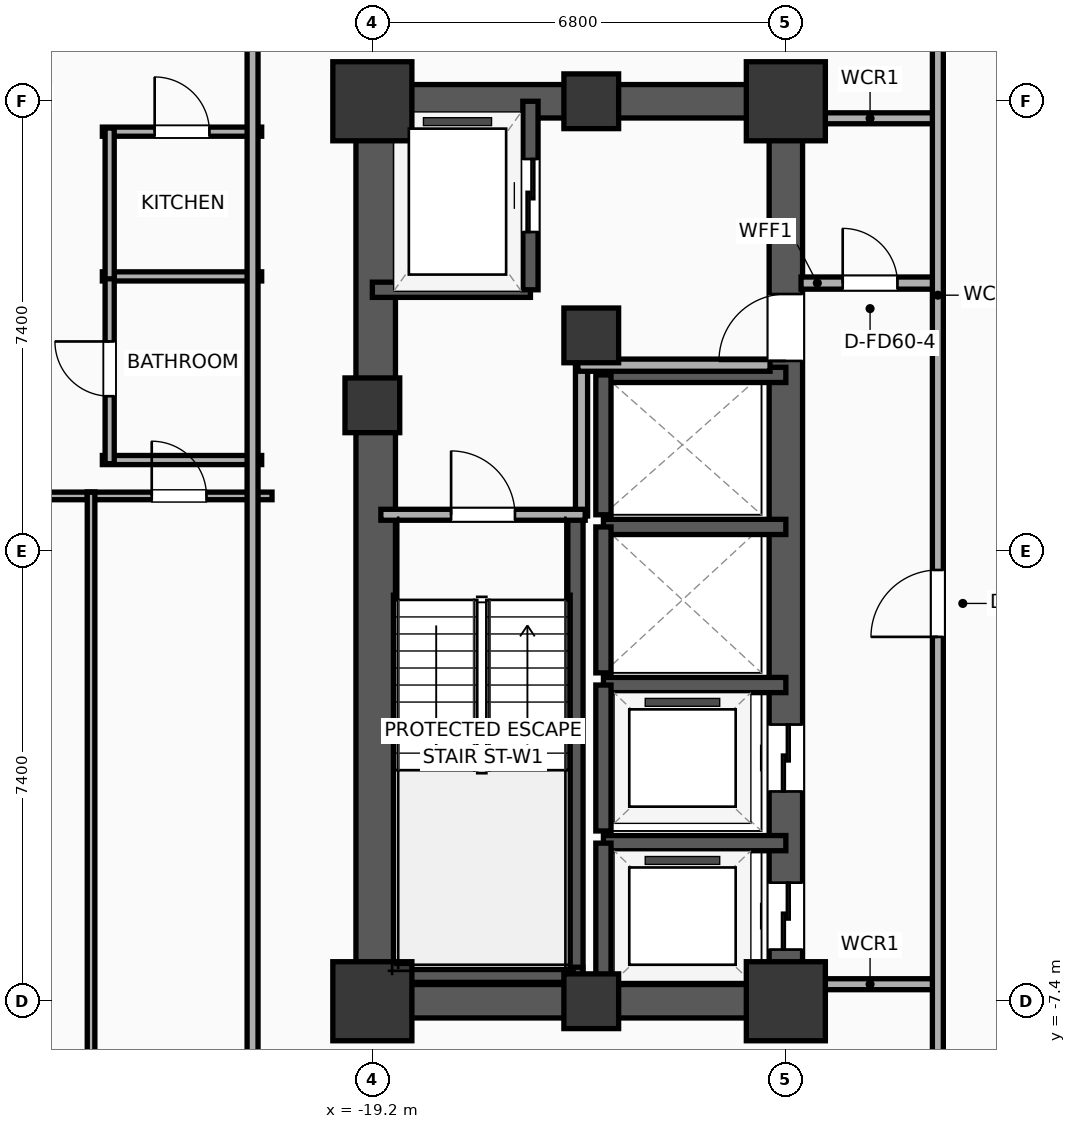
"""IFC4 building model, lengths in metres.
Left out: names, types, materials, properties, quantities, classifications, styles, units other than length and angle.
Written with IfcOpenShell. Run it as: python <this file> out.ifc"""

import sys

from ifc_helpers import new_model, si_unit, direction, frame, frame_2d, origin, origin_2d, place, context, subcontext, project, spatial, rectangle, extrude, element, fill, save


model = new_model("IFC4")
c1 = context("Model", 3, precision=1e-05, world=origin(), true_north=direction((0.0, 1.0)))
c2 = subcontext(c1, "Body", "Model", "MODEL_VIEW")
j1 = project(units=[si_unit("LENGTHUNIT", "METRE"), si_unit("PLANEANGLEUNIT", "RADIAN")], contexts=[c1])
p1 = place(None, origin())
s1 = spatial("IfcSite", under=j1, at=p1, CompositionType="ELEMENT")
p2 = place(p1, origin())
s2 = spatial("IfcBuilding", under=s1, at=p2, CompositionType="ELEMENT")
p3 = place(p2, frame((0.0, 0.0, 124.8)))
s3 = spatial("IfcBuildingStorey", under=s2, at=p3, CompositionType="ELEMENT", Elevation=124.8)
p4 = place(p3, frame((-19.2, -7.4, 0.0), z_axis=(0.0, 0.0, 1.0), x_axis=(1.0, 0.0, 0.0)))
e1 = element("IfcColumn", 1, at=p4, inside=s3, PredefinedType="COLUMN", context=c2, shape_type="SweptSolid", body=[
    extrude(rectangle(XDim=1.3, YDim=1.3, at=origin_2d()), origin(), (0.0, 0.0, 1.0), 3.9),
])
p5 = place(p3, frame((-19.2, 2.4, 0.0), z_axis=(0.0, 0.0, 1.0), x_axis=(1.0, 0.0, 0.0)))
e2 = element("IfcColumn", 2, at=p5, inside=s3, PredefinedType="COLUMN", context=c2, shape_type="SweptSolid", body=[
    extrude(rectangle(XDim=0.9, YDim=0.9, at=origin_2d()), origin(), (0.0, 0.0, 1.0), 3.9),
])
p6 = place(p3, frame((-19.2, 7.4, 0.0), z_axis=(0.0, 0.0, 1.0), x_axis=(1.0, 0.0, 0.0)))
e3 = element("IfcColumn", 3, at=p6, inside=s3, PredefinedType="COLUMN", context=c2, shape_type="SweptSolid", body=[
    extrude(rectangle(XDim=1.3, YDim=1.3, at=origin_2d()), origin(), (0.0, 0.0, 1.0), 3.9),
])
for number, where, z_axis, x_axis in (
    (4, (-15.6, -7.4, 0.0), (0.0, 0.0, 1.0), (1.0, 0.0, 0.0)),
    (5, (-15.6, 7.4, 0.0), (0.0, 0.0, 1.0), (1.0, 0.0, 0.0)),
):
    element("IfcColumn", number, at=place(p3, frame(where, z_axis=z_axis, x_axis=x_axis)), inside=s3, PredefinedType="COLUMN", context=c2, shape_type="SweptSolid", body=[
        extrude(rectangle(XDim=0.9, YDim=0.9, at=origin_2d()), origin(), (0.0, 0.0, 1.0), 3.9),
    ])
p7 = place(p3, frame((-12.4, -7.4, 0.0), z_axis=(0.0, 0.0, 1.0), x_axis=(1.0, 0.0, 0.0)))
e6 = element("IfcColumn", 6, at=p7, inside=s3, PredefinedType="COLUMN", context=c2, shape_type="SweptSolid", body=[
    extrude(rectangle(XDim=1.3, YDim=1.3, at=origin_2d()), origin(), (0.0, 0.0, 1.0), 3.9),
])
p8 = place(p3, frame((-15.6, 3.55, 0.0), z_axis=(0.0, 0.0, 1.0), x_axis=(1.0, 0.0, 0.0)))
e7 = element("IfcColumn", 7, at=p8, inside=s3, PredefinedType="COLUMN", context=c2, shape_type="SweptSolid", body=[
    extrude(rectangle(XDim=0.9, YDim=0.9, at=origin_2d()), origin(), (0.0, 0.0, 1.0), 3.9),
])
p9 = place(p3, frame((-12.4, 7.4, 0.0), z_axis=(0.0, 0.0, 1.0), x_axis=(1.0, 0.0, 0.0)))
e8 = element("IfcColumn", 8, at=p9, inside=s3, PredefinedType="COLUMN", context=c2, shape_type="SweptSolid", body=[
    extrude(rectangle(XDim=1.3, YDim=1.3, at=origin_2d()), origin(), (0.0, 0.0, 1.0), 3.9),
])
for number, where, z_axis, x_axis in (
    (9, (-19.475, -7.4, 0.0), (0.0, 0.0, 1.0), (1.0, 0.0, 0.0)),
    (10, (-19.475, 7.4, 0.0), (0.0, 0.0, 1.0), (1.0, 0.0, 0.0)),
):
    element("IfcWall", number, at=place(p3, frame(where, z_axis=z_axis, x_axis=x_axis)), inside=s3, PredefinedType="SHEAR", context=c2, shape_type="SweptSolid", body=[
        extrude(rectangle(XDim=7.35, YDim=0.55, at=frame_2d((3.675, 0.0))), origin(), (0.0, 0.0, 1.0), 3.65),
    ])
p10 = place(p3, frame((-19.145, -7.4, 0.0), z_axis=(0.0, 0.0, 1.0), x_axis=(0.0, 1.0, 0.0)))
e11 = element("IfcWall", 11, at=p10, inside=s3, PredefinedType="SHEAR", context=c2, shape_type="SweptSolid", body=[
    extrude(rectangle(XDim=14.8, YDim=0.65, at=frame_2d((7.4, 0.0))), origin(), (0.0, 0.0, 1.0), 3.65),
])
p11 = place(p3, frame((-12.4, -7.4, 0.0), z_axis=(0.0, 0.0, 1.0), x_axis=(0.0, 1.0, 0.0)))
e12 = element("IfcWall", 12, at=p11, inside=s3, PredefinedType="SHEAR", context=c2, shape_type="SweptSolid", body=[
    extrude(rectangle(XDim=14.8, YDim=0.55, at=frame_2d((7.4, 0.0))), origin(), (0.0, 0.0, 1.0), 3.65),
])
p12 = place(p11, frame((0.85, 0.0, 0.0)))
e13 = element("IfcOpeningElement", 13, at=p12, cuts=e12, PredefinedType="OPENING", context=c2, shape_type="SweptSolid", body=[
    extrude(rectangle(XDim=1.1, YDim=2.05, at=frame_2d((0.55, 1.025))), frame((0.0, 0.285, 0.0), z_axis=(0.0, -1.0, 0.0), x_axis=(1.0, 0.0, 0.0)), (0.0, 0.0, 1.0), 0.57),
])
p13 = place(p11, frame((3.45, 0.0, 0.0)))
e14 = element("IfcOpeningElement", 14, at=p13, cuts=e12, PredefinedType="OPENING", context=c2, shape_type="SweptSolid", body=[
    extrude(rectangle(XDim=1.1, YDim=2.05, at=frame_2d((0.55, 1.025))), frame((0.0, 0.285, 0.0), z_axis=(0.0, -1.0, 0.0), x_axis=(1.0, 0.0, 0.0)), (0.0, 0.0, 1.0), 0.57),
])
p14 = place(p11, frame((10.53, 0.0, 0.0)))
e15 = element("IfcOpeningElement", 15, at=p14, cuts=e12, PredefinedType="OPENING", context=c2, shape_type="SweptSolid", body=[
    extrude(rectangle(XDim=1.1, YDim=2.05, at=frame_2d((0.55, 1.025))), frame((0.0, 0.285, 0.0), z_axis=(0.0, -1.0, 0.0), x_axis=(1.0, 0.0, 0.0)), (0.0, 0.0, 1.0), 0.57),
])
p15 = place(p3, frame((-15.86, -7.085, 0.0), z_axis=(0.0, 0.0, 1.0), x_axis=(0.0, 1.0, 0.0)))
e16 = element("IfcWall", 16, at=p15, inside=s3, PredefinedType="SOLIDWALL", context=c2, shape_type="SweptSolid", body=[
    extrude(rectangle(XDim=7.685, YDim=0.25, at=frame_2d((3.843, 0.0))), origin(), (0.0, 0.0, 1.0), 3.65),
])
p16 = place(p3, frame((-19.2, -6.965, 0.0), z_axis=(0.0, 0.0, 1.0), x_axis=(1.0, 0.0, 0.0)))
e17 = element("IfcWall", 17, at=p16, inside=s3, PredefinedType="SOLIDWALL", context=c2, shape_type="SweptSolid", body=[
    extrude(rectangle(XDim=3.46, YDim=0.25, at=frame_2d((1.73, 0.0))), origin(), (0.0, 0.0, 1.0), 3.65),
])
p17 = place(p3, frame((-19.2, 4.3, 0.0), z_axis=(0.0, 0.0, 1.0), x_axis=(1.0, 0.0, 0.0)))
e18 = element("IfcWall", 18, at=p17, inside=s3, PredefinedType="SOLIDWALL", context=c2, shape_type="SweptSolid", body=[
    extrude(rectangle(XDim=2.6, YDim=0.25, at=frame_2d((1.3, 0.0))), origin(), (0.0, 0.0, 1.0), 3.65),
])
p18 = place(p3, frame((-16.6, 4.3, 0.0), z_axis=(0.0, 0.0, 1.0), x_axis=(0.0, 1.0, 0.0)))
e19 = element("IfcWall", 19, at=p18, inside=s3, PredefinedType="SOLIDWALL", context=c2, shape_type="SweptSolid", body=[
    extrude(rectangle(XDim=3.1, YDim=0.25, at=frame_2d((1.55, 0.0))), origin(), (0.0, 0.0, 1.0), 3.65),
])
p19 = place(p18, frame((0.95, 0.0, 0.0)))
e20 = element("IfcOpeningElement", 20, at=p19, cuts=e19, PredefinedType="OPENING", context=c2, shape_type="SweptSolid", body=[
    extrude(rectangle(XDim=1.2, YDim=2.05, at=frame_2d((0.6, 1.025))), frame((0.0, 0.135, 0.0), z_axis=(0.0, -1.0, 0.0), x_axis=(1.0, 0.0, 0.0)), (0.0, 0.0, 1.0), 0.27),
])
p20 = place(p3, frame((-12.4, -4.8, 0.0), z_axis=(0.0, 0.0, 1.0), x_axis=(-1.0, 0.0, 0.0)))
e21 = element("IfcWall", 21, at=p20, inside=s3, PredefinedType="SOLIDWALL", context=c2, shape_type="SweptSolid", body=[
    extrude(rectangle(XDim=3.0, YDim=0.25, at=frame_2d((1.5, 0.0))), origin(), (0.0, 0.0, 1.0), 3.65),
])
p21 = place(p3, frame((-15.4, -4.8, 0.0), z_axis=(0.0, 0.0, 1.0), x_axis=(0.0, -1.0, 0.0)))
e22 = element("IfcWall", 22, at=p21, inside=s3, PredefinedType="SOLIDWALL", context=c2, shape_type="SweptSolid", body=[
    extrude(rectangle(XDim=2.6, YDim=0.25, at=frame_2d((1.3, 0.0))), origin(), (0.0, 0.0, 1.0), 3.65),
])
p22 = place(p3, frame((-12.4, -2.2, 0.0), z_axis=(0.0, 0.0, 1.0), x_axis=(-1.0, 0.0, 0.0)))
e23 = element("IfcWall", 23, at=p22, inside=s3, PredefinedType="SOLIDWALL", context=c2, shape_type="SweptSolid", body=[
    extrude(rectangle(XDim=3.0, YDim=0.25, at=frame_2d((1.5, 0.0))), origin(), (0.0, 0.0, 1.0), 3.65),
])
p23 = place(p3, frame((-15.4, -2.2, 0.0), z_axis=(0.0, 0.0, 1.0), x_axis=(0.0, -1.0, 0.0)))
e24 = element("IfcWall", 24, at=p23, inside=s3, PredefinedType="SOLIDWALL", context=c2, shape_type="SweptSolid", body=[
    extrude(rectangle(XDim=2.4, YDim=0.25, at=frame_2d((1.2, 0.0))), origin(), (0.0, 0.0, 1.0), 3.65),
])
p24 = place(p3, frame((-12.4, 0.4, 0.0), z_axis=(0.0, 0.0, 1.0), x_axis=(-1.0, 0.0, 0.0)))
e25 = element("IfcWall", 25, at=p24, inside=s3, PredefinedType="SOLIDWALL", context=c2, shape_type="SweptSolid", body=[
    extrude(rectangle(XDim=3.0, YDim=0.25, at=frame_2d((1.5, 0.0))), origin(), (0.0, 0.0, 1.0), 3.65),
])
p25 = place(p3, frame((-15.4, 0.4, 0.0), z_axis=(0.0, 0.0, 1.0), x_axis=(0.0, -1.0, 0.0)))
e26 = element("IfcWall", 26, at=p25, inside=s3, PredefinedType="SOLIDWALL", context=c2, shape_type="SweptSolid", body=[
    extrude(rectangle(XDim=2.4, YDim=0.25, at=frame_2d((1.2, 0.0))), origin(), (0.0, 0.0, 1.0), 3.65),
])
p26 = place(p3, frame((-12.4, 2.9, 0.0), z_axis=(0.0, 0.0, 1.0), x_axis=(-1.0, 0.0, 0.0)))
e27 = element("IfcWall", 27, at=p26, inside=s3, PredefinedType="SOLIDWALL", context=c2, shape_type="SweptSolid", body=[
    extrude(rectangle(XDim=3.0, YDim=0.25, at=frame_2d((1.5, 0.0))), origin(), (0.0, 0.0, 1.0), 3.65),
])
p27 = place(p3, frame((-15.4, 2.9, 0.0), z_axis=(0.0, 0.0, 1.0), x_axis=(0.0, -1.0, 0.0)))
e28 = element("IfcWall", 28, at=p27, inside=s3, PredefinedType="SOLIDWALL", context=c2, shape_type="SweptSolid", body=[
    extrude(rectangle(XDim=2.3, YDim=0.25, at=frame_2d((1.15, 0.0))), origin(), (0.0, 0.0, 1.0), 3.65),
])
p28 = place(p3, frame((-15.76, 0.58, 0.0), z_axis=(0.0, 0.0, 1.0), x_axis=(0.0, 1.0, 0.0)))
e29 = element("IfcWall", 29, at=p28, inside=s3, PredefinedType="PARTITIONING", context=c2, shape_type="SweptSolid", body=[
    extrude(rectangle(XDim=2.52, YDim=0.2, at=frame_2d((1.26, 0.0))), origin(), (0.0, 0.0, 1.0), 3.65),
])
p29 = place(p3, frame((-15.82, 3.06, 0.0), z_axis=(0.0, 0.0, 1.0), x_axis=(1.0, 0.0, 0.0)))
e30 = element("IfcWall", 30, at=p29, inside=s3, PredefinedType="PARTITIONING", context=c2, shape_type="SweptSolid", body=[
    extrude(rectangle(XDim=3.16, YDim=0.2, at=frame_2d((1.58, 0.0))), origin(), (0.0, 0.0, 1.0), 3.65),
])
p30 = place(p3, frame((-19.06, 0.6, 0.0), z_axis=(0.0, 0.0, 1.0), x_axis=(1.0, 0.0, 0.0)))
e31 = element("IfcWall", 31, at=p30, inside=s3, PredefinedType="PARTITIONING", context=c2, shape_type="SweptSolid", body=[
    extrude(rectangle(XDim=3.36, YDim=0.18, at=frame_2d((1.68, 0.0))), origin(), (0.0, 0.0, 1.0), 3.65),
])
p31 = place(p30, frame((1.155, 0.0, 0.0)))
e32 = element("IfcOpeningElement", 32, at=p31, cuts=e31, PredefinedType="OPENING", context=c2, shape_type="SweptSolid", body=[
    extrude(rectangle(XDim=1.05, YDim=2.05, at=frame_2d((0.525, 1.025))), frame((0.0, 0.1, 0.0), z_axis=(0.0, -1.0, 0.0), x_axis=(1.0, 0.0, 0.0)), (0.0, 0.0, 1.0), 0.2),
])
p32 = place(p3, frame((-12.15, 4.41, 0.0), z_axis=(0.0, 0.0, 1.0), x_axis=(1.0, 0.0, 0.0)))
e33 = element("IfcWall", 33, at=p32, inside=s3, PredefinedType="PARTITIONING", context=c2, shape_type="SweptSolid", body=[
    extrude(rectangle(XDim=2.27, YDim=0.2, at=frame_2d((1.135, 0.0))), origin(), (0.0, 0.0, 1.0), 3.65),
])
p33 = place(p32, frame((0.685, 0.0, 0.0)))
e34 = element("IfcOpeningElement", 34, at=p33, cuts=e33, PredefinedType="OPENING", context=c2, shape_type="SweptSolid", body=[
    extrude(rectangle(XDim=0.9, YDim=2.05, at=frame_2d((0.45, 1.025))), frame((0.0, 0.11, 0.0), z_axis=(0.0, -1.0, 0.0), x_axis=(1.0, 0.0, 0.0)), (0.0, 0.0, 1.0), 0.22),
])
for number, where, z_axis, x_axis in (
    (35, (-12.15, 7.12, 0.0), (0.0, 0.0, 1.0), (1.0, 0.0, 0.0)),
    (36, (-12.15, -7.12, 0.0), (0.0, 0.0, 1.0), (1.0, 0.0, 0.0)),
):
    element("IfcWall", number, at=place(p3, frame(where, z_axis=z_axis, x_axis=x_axis)), inside=s3, PredefinedType="PARTITIONING", context=c2, shape_type="SweptSolid", body=[
        extrude(rectangle(XDim=2.27, YDim=0.18, at=frame_2d((1.135, 0.0))), origin(), (0.0, 0.0, 1.0), 3.65),
    ])
p34 = place(p3, frame((-9.9, -8.58, 0.0), z_axis=(0.0, 0.0, 1.0), x_axis=(0.0, 1.0, 0.0)))
e37 = element("IfcWall", 37, at=p34, inside=s3, PredefinedType="PARTITIONING", context=c2, shape_type="SweptSolid", body=[
    extrude(rectangle(XDim=17.16, YDim=0.18, at=frame_2d((8.58, 0.0))), origin(), (0.0, 0.0, 1.0), 3.65),
])
p35 = place(p34, frame((7.172, 0.0, 0.0)))
e38 = element("IfcOpeningElement", 38, at=p35, cuts=e37, PredefinedType="OPENING", context=c2, shape_type="SweptSolid", body=[
    extrude(rectangle(XDim=1.1, YDim=2.05, at=frame_2d((0.55, 1.025))), frame((0.0, 0.1, 0.0), z_axis=(0.0, -1.0, 0.0), x_axis=(1.0, 0.0, 0.0)), (0.0, 0.0, 1.0), 0.2),
])
p36 = place(p3, frame((-23.64, 6.9, 0.0), z_axis=(0.0, 0.0, 1.0), x_axis=(1.0, 0.0, 0.0)))
e39 = element("IfcWall", 39, at=p36, inside=s3, PredefinedType="PLUMBINGWALL", context=c2, shape_type="SweptSolid", body=[
    extrude(rectangle(XDim=2.62, YDim=0.15, at=frame_2d((1.31, 0.0))), origin(), (0.0, 0.0, 1.0), 3.65),
])
p37 = place(p36, frame((0.86, 0.0, 0.0)))
e40 = element("IfcOpeningElement", 40, at=p37, cuts=e39, PredefinedType="OPENING", context=c2, shape_type="SweptSolid", body=[
    extrude(rectangle(XDim=0.9, YDim=2.05, at=frame_2d((0.45, 1.025))), frame((0.0, 0.085, 0.0), z_axis=(0.0, -1.0, 0.0), x_axis=(1.0, 0.0, 0.0)), (0.0, 0.0, 1.0), 0.17),
])
for number, where, z_axis, x_axis in (
    (41, (-23.64, 4.52, 0.0), (0.0, 0.0, 1.0), (1.0, 0.0, 0.0)),
    (42, (-23.64, 1.5, 0.0), (0.0, 0.0, 1.0), (1.0, 0.0, 0.0)),
):
    element("IfcWall", number, at=place(p3, frame(where, z_axis=z_axis, x_axis=x_axis)), inside=s3, PredefinedType="PLUMBINGWALL", context=c2, shape_type="SweptSolid", body=[
        extrude(rectangle(XDim=2.62, YDim=0.15, at=frame_2d((1.31, 0.0))), origin(), (0.0, 0.0, 1.0), 3.65),
    ])
p38 = place(p3, frame((-23.52, 1.44, 0.0), z_axis=(0.0, 0.0, 1.0), x_axis=(0.0, 1.0, 0.0)))
e43 = element("IfcWall", 43, at=p38, inside=s3, PredefinedType="PLUMBINGWALL", context=c2, shape_type="SweptSolid", body=[
    extrude(rectangle(XDim=3.12, YDim=0.15, at=frame_2d((1.56, 0.0))), origin(), (0.0, 0.0, 1.0), 3.65),
])
p39 = place(p38, frame((1.11, 0.0, 0.0)))
e44 = element("IfcOpeningElement", 44, at=p39, cuts=e43, PredefinedType="OPENING", context=c2, shape_type="SweptSolid", body=[
    extrude(rectangle(XDim=0.9, YDim=2.05, at=frame_2d((0.45, 1.025))), frame((0.0, 0.085, 0.0), z_axis=(0.0, -1.0, 0.0), x_axis=(1.0, 0.0, 0.0)), (0.0, 0.0, 1.0), 0.17),
])
p40 = place(p3, frame((-23.52, 4.48, 0.0), z_axis=(0.0, 0.0, 1.0), x_axis=(0.0, 1.0, 0.0)))
e45 = element("IfcWall", 45, at=p40, inside=s3, PredefinedType="PLUMBINGWALL", context=c2, shape_type="SweptSolid", body=[
    extrude(rectangle(XDim=2.48, YDim=0.15, at=frame_2d((1.24, 0.0))), origin(), (0.0, 0.0, 1.0), 3.65),
])
p41 = place(p3, frame((-26.543, 0.91, 0.0), z_axis=(0.0, 0.0, 1.0), x_axis=(1.0, 0.0, 0.0)))
e46 = element("IfcWall", 46, at=p41, inside=s3, PredefinedType="PARTITIONING", context=c2, shape_type="SweptSolid", body=[
    extrude(rectangle(XDim=2.78, YDim=0.125, at=frame_2d((1.39, 0.0))), origin(), (0.0, 0.0, 1.0), 3.65),
])
p42 = place(p41, frame((0.94, 0.0, 0.0)))
e47 = element("IfcOpeningElement", 47, at=p42, cuts=e46, PredefinedType="OPENING", context=c2, shape_type="SweptSolid", body=[
    extrude(rectangle(XDim=0.9, YDim=2.05, at=frame_2d((0.45, 1.025))), frame((0.0, 0.073, 0.0), z_axis=(0.0, -1.0, 0.0), x_axis=(1.0, 0.0, 0.0)), (0.0, 0.0, 1.0), 0.145),
])
p43 = place(p3, frame((-23.888, 0.91, 0.0), z_axis=(0.0, 0.0, 1.0), x_axis=(1.0, 0.0, 0.0)))
e48 = element("IfcWall", 48, at=p43, inside=s3, PredefinedType="PARTITIONING", context=c2, shape_type="SweptSolid", body=[
    extrude(rectangle(XDim=3.038, YDim=0.125, at=frame_2d((1.519, 0.0))), origin(), (0.0, 0.0, 1.0), 3.65),
])
p44 = place(p43, frame((1.061, 0.0, 0.0)))
e49 = element("IfcOpeningElement", 49, at=p44, cuts=e48, PredefinedType="OPENING", context=c2, shape_type="SweptSolid", body=[
    extrude(rectangle(XDim=0.9, YDim=2.05, at=frame_2d((0.45, 1.025))), frame((0.0, 0.073, 0.0), z_axis=(0.0, -1.0, 0.0), x_axis=(1.0, 0.0, 0.0)), (0.0, 0.0, 1.0), 0.145),
])
p45 = place(p3, frame((-23.826, -8.81, 0.0), z_axis=(0.0, 0.0, 1.0), x_axis=(0.0, 1.0, 0.0)))
e50 = element("IfcWall", 50, at=p45, inside=s3, PredefinedType="PARTITIONING", context=c2, shape_type="SweptSolid", body=[
    extrude(rectangle(XDim=9.78, YDim=0.125, at=frame_2d((4.89, 0.0))), origin(), (0.0, 0.0, 1.0), 3.65),
])
p46 = place(p3, frame((-21.17, -8.61, 0.0), z_axis=(0.0, 0.0, 1.0), x_axis=(0.0, 1.0, 0.0)))
e51 = element("IfcWall", 51, at=p46, inside=s3, PredefinedType="PARTITIONING", context=c2, shape_type="SweptSolid", body=[
    extrude(rectangle(XDim=17.22, YDim=0.18, at=frame_2d((8.61, 0.0))), origin(), (0.0, 0.0, 1.0), 3.65),
])
p47 = place(p19, origin())
e52 = element("IfcDoor", 52, at=p47, inside=s3, OperationType="SLIDING_TO_LEFT", PredefinedType="DOOR", context=c2, shape_type="SweptSolid", body=[
    extrude(rectangle(XDim=1.2, YDim=2.05, at=frame_2d((0.6, 1.025))), frame((0.0, 0.025, 0.0), z_axis=(0.0, -1.0, 0.0), x_axis=(1.0, 0.0, 0.0)), (0.0, 0.0, 1.0), 0.05),
])
fill(e20, e52)
p48 = place(p12, origin())
e53 = element("IfcDoor", 53, at=p48, inside=s3, OperationType="SLIDING_TO_LEFT", PredefinedType="DOOR", context=c2, shape_type="SweptSolid", body=[
    extrude(rectangle(XDim=1.1, YDim=2.05, at=frame_2d((0.55, 1.025))), frame((0.0, 0.025, 0.0), z_axis=(0.0, -1.0, 0.0), x_axis=(1.0, 0.0, 0.0)), (0.0, 0.0, 1.0), 0.05),
])
fill(e13, e53)
p49 = place(p13, origin())
e54 = element("IfcDoor", 54, at=p49, inside=s3, OperationType="SLIDING_TO_LEFT", PredefinedType="DOOR", context=c2, shape_type="SweptSolid", body=[
    extrude(rectangle(XDim=1.1, YDim=2.05, at=frame_2d((0.55, 1.025))), frame((0.0, 0.025, 0.0), z_axis=(0.0, -1.0, 0.0), x_axis=(1.0, 0.0, 0.0)), (0.0, 0.0, 1.0), 0.05),
])
fill(e14, e54)
p50 = place(p31, origin())
e55 = element("IfcDoor", 55, at=p50, inside=s3, OperationType="SINGLE_SWING_LEFT", PredefinedType="DOOR", context=c2, shape_type="SweptSolid", body=[
    extrude(rectangle(XDim=1.05, YDim=2.05, at=frame_2d((0.525, 1.025))), frame((0.0, 0.025, 0.0), z_axis=(0.0, -1.0, 0.0), x_axis=(1.0, 0.0, 0.0)), (0.0, 0.0, 1.0), 0.05),
])
fill(e32, e55)
p51 = place(p33, origin())
e56 = element("IfcDoor", 56, at=p51, inside=s3, OperationType="SINGLE_SWING_LEFT", PredefinedType="DOOR", context=c2, shape_type="SweptSolid", body=[
    extrude(rectangle(XDim=0.9, YDim=2.05, at=frame_2d((0.45, 1.025))), frame((0.0, 0.025, 0.0), z_axis=(0.0, -1.0, 0.0), x_axis=(1.0, 0.0, 0.0)), (0.0, 0.0, 1.0), 0.05),
])
fill(e34, e56)
p52 = place(p35, origin())
e57 = element("IfcDoor", 57, at=p52, inside=s3, OperationType="SINGLE_SWING_LEFT", PredefinedType="DOOR", context=c2, shape_type="SweptSolid", body=[
    extrude(rectangle(XDim=1.1, YDim=2.05, at=frame_2d((0.55, 1.025))), frame((0.0, 0.025, 0.0), z_axis=(0.0, -1.0, 0.0), x_axis=(1.0, 0.0, 0.0)), (0.0, 0.0, 1.0), 0.05),
])
fill(e38, e57)
p53 = place(p37, origin())
e58 = element("IfcDoor", 58, at=p53, inside=s3, OperationType="SINGLE_SWING_LEFT", PredefinedType="DOOR", context=c2, shape_type="SweptSolid", body=[
    extrude(rectangle(XDim=0.9, YDim=2.05, at=frame_2d((0.45, 1.025))), frame((0.0, 0.025, 0.0), z_axis=(0.0, -1.0, 0.0), x_axis=(1.0, 0.0, 0.0)), (0.0, 0.0, 1.0), 0.05),
])
fill(e40, e58)
p54 = place(p39, origin())
e59 = element("IfcDoor", 59, at=p54, inside=s3, OperationType="SINGLE_SWING_RIGHT", PredefinedType="DOOR", context=c2, shape_type="SweptSolid", body=[
    extrude(rectangle(XDim=0.9, YDim=2.05, at=frame_2d((0.45, 1.025))), frame((0.0, 0.025, 0.0), z_axis=(0.0, -1.0, 0.0), x_axis=(1.0, 0.0, 0.0)), (0.0, 0.0, 1.0), 0.05),
])
fill(e44, e59)
p55 = place(p44, origin())
e60 = element("IfcDoor", 60, at=p55, inside=s3, OperationType="SINGLE_SWING_LEFT", PredefinedType="DOOR", context=c2, shape_type="SweptSolid", body=[
    extrude(rectangle(XDim=0.9, YDim=2.05, at=frame_2d((0.45, 1.025))), frame((0.0, 0.025, 0.0), z_axis=(0.0, -1.0, 0.0), x_axis=(1.0, 0.0, 0.0)), (0.0, 0.0, 1.0), 0.05),
])
fill(e49, e60)
p56 = place(p14, origin())
e61 = element("IfcDoor", 61, at=p56, inside=s3, OperationType="SINGLE_SWING_LEFT", PredefinedType="DOOR", context=c2, shape_type="SweptSolid", body=[
    extrude(rectangle(XDim=1.1, YDim=2.05, at=frame_2d((0.55, 1.025))), frame((0.0, 0.025, 0.0), z_axis=(0.0, -1.0, 0.0), x_axis=(1.0, 0.0, 0.0)), (0.0, 0.0, 1.0), 0.05),
])
fill(e15, e61)
save(model, sys.argv[1])
